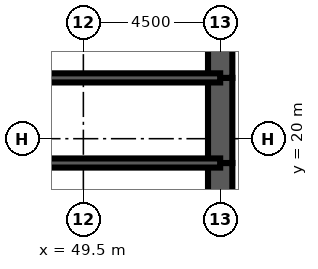
"""IFC4 building model, lengths in metres.
Left out: names, types, materials, properties, quantities, classifications, styles, units other than length and angle.
Written with IfcOpenShell. Run it as: python <this file> out.ifc"""

import sys

from ifc_helpers import new_model, si_unit, direction, frame, frame_2d, origin, place, context, subcontext, project, spatial, rectangle, extrude, element, fill, save


model = new_model("IFC4")
c1 = context("Model", 3, precision=1e-05, world=origin(), true_north=direction((0.0, 1.0)))
c2 = subcontext(c1, "Body", "Model", "MODEL_VIEW")
j1 = project(units=[si_unit("LENGTHUNIT", "METRE"), si_unit("PLANEANGLEUNIT", "RADIAN")], contexts=[c1])
p1 = place(None, origin())
s1 = spatial("IfcSite", under=j1, at=p1, CompositionType="ELEMENT")
p2 = place(p1, origin())
s2 = spatial("IfcBuilding", under=s1, at=p2, CompositionType="ELEMENT")
p3 = place(p2, frame((0.0, 0.0, 198.4)))
s3 = spatial("IfcBuildingStorey", under=s2, at=p3, CompositionType="ELEMENT", Elevation=198.4)
p4 = place(p3, frame((54.0, 16.0, 0.0), z_axis=(0.0, 0.0, 1.0), x_axis=(0.0, 1.0, 0.0)))
e1 = element("IfcWall", 1, at=p4, inside=s3, PredefinedType="SHEAR", context=c2, shape_type="SweptSolid", body=[
    extrude(rectangle(XDim=3.2, YDim=0.8, at=frame_2d((1.6, 0.0))), origin(), (0.0, 0.0, 1.0), 4.2),
])
p5 = place(p3, frame((54.0, 19.2, 0.0), z_axis=(0.0, 0.0, 1.0), x_axis=(0.0, 1.0, 0.0)))
e2 = element("IfcWall", 2, at=p5, inside=s3, PredefinedType="SHEAR", context=c2, shape_type="SweptSolid", body=[
    extrude(rectangle(XDim=2.8, YDim=0.8, at=frame_2d((1.4, 0.0))), origin(), (0.0, 0.0, 1.0), 4.2),
])
p6 = place(p5, frame((0.4, 0.0, 0.0)))
e3 = element("IfcOpeningElement", 3, at=p6, cuts=e2, PredefinedType="OPENING", context=c2, shape_type="SweptSolid", body=[
    extrude(rectangle(XDim=1.8, YDim=2.1, at=frame_2d((0.9, 1.05))), frame((0.0, 0.41, 0.0), z_axis=(0.0, -1.0, 0.0), x_axis=(1.0, 0.0, 0.0)), (0.0, 0.0, 1.0), 0.82),
])
p7 = place(p3, frame((54.0, 22.0, 0.0), z_axis=(0.0, 0.0, 1.0), x_axis=(0.0, 1.0, 0.0)))
e4 = element("IfcWall", 4, at=p7, inside=s3, PredefinedType="SHEAR", context=c2, shape_type="SweptSolid", body=[
    extrude(rectangle(XDim=4.0, YDim=0.8, at=frame_2d((2.0, 0.0))), origin(), (0.0, 0.0, 1.0), 4.2),
])
p8 = place(p3, frame((45.0, 19.2, 0.0), z_axis=(0.0, 0.0, 1.0), x_axis=(1.0, 0.0, 0.0)))
e5 = element("IfcWall", 5, at=p8, inside=s3, PredefinedType="SOLIDWALL", context=c2, shape_type="SweptSolid", body=[
    extrude(rectangle(XDim=9.0, YDim=0.3, at=frame_2d((4.5, 0.0))), origin(), (0.0, 0.0, 1.0), 4.2),
])
p9 = place(p8, frame((7.35, 0.0, 0.0)))
e6 = element("IfcOpeningElement", 6, at=p9, cuts=e5, PredefinedType="OPENING", context=c2, shape_type="SweptSolid", body=[
    extrude(rectangle(XDim=1.0, YDim=2.1, at=frame_2d((0.5, 1.05))), frame((0.0, 0.16, 0.0), z_axis=(0.0, -1.0, 0.0), x_axis=(1.0, 0.0, 0.0)), (0.0, 0.0, 1.0), 0.32),
])
p10 = place(p3, frame((48.0, 22.0, 0.0), z_axis=(0.0, 0.0, 1.0), x_axis=(1.0, 0.0, 0.0)))
e7 = element("IfcWall", 7, at=p10, inside=s3, PredefinedType="SOLIDWALL", context=c2, shape_type="SweptSolid", body=[
    extrude(rectangle(XDim=6.0, YDim=0.3, at=frame_2d((3.0, 0.0))), origin(), (0.0, 0.0, 1.0), 4.2),
])
p11 = place(p10, frame((2.0, 0.0, 0.0)))
e8 = element("IfcOpeningElement", 8, at=p11, cuts=e7, PredefinedType="OPENING", context=c2, shape_type="SweptSolid", body=[
    extrude(rectangle(XDim=1.0, YDim=2.1, at=frame_2d((0.5, 1.05))), frame((0.0, 0.16, 0.0), z_axis=(0.0, -1.0, 0.0), x_axis=(1.0, 0.0, 0.0)), (0.0, 0.0, 1.0), 0.32),
])
p12 = place(p10, frame((4.05, 0.0, 0.0)))
e9 = element("IfcOpeningElement", 9, at=p12, cuts=e7, PredefinedType="OPENING", context=c2, shape_type="SweptSolid", body=[
    extrude(rectangle(XDim=1.0, YDim=2.1, at=frame_2d((0.5, 1.05))), frame((0.0, 0.16, 0.0), z_axis=(0.0, -1.0, 0.0), x_axis=(1.0, 0.0, 0.0)), (0.0, 0.0, 1.0), 0.32),
])
p13 = place(p3, frame((51.425, 22.15, 0.0), z_axis=(0.0, 0.0, 1.0), x_axis=(0.0, 1.0, 0.0)))
e10 = element("IfcWall", 10, at=p13, inside=s3, PredefinedType="PARTITIONING", context=c2, shape_type="SweptSolid", body=[
    extrude(rectangle(XDim=3.7, YDim=0.15, at=frame_2d((1.85, 0.0))), origin(), (0.0, 0.0, 1.0), 3.0),
])
p14 = place(p3, frame((49.4, 19.35, 0.0), z_axis=(0.0, 0.0, 1.0), x_axis=(0.0, 1.0, 0.0)))
e11 = element("IfcWall", 11, at=p14, inside=s3, PredefinedType="PARTITIONING", context=c2, shape_type="SweptSolid", body=[
    extrude(rectangle(XDim=2.5, YDim=0.15, at=frame_2d((1.25, 0.0))), origin(), (0.0, 0.0, 1.0), 3.0),
])
p15 = place(p14, frame((1.15, 0.0, 0.0)))
e12 = element("IfcOpeningElement", 12, at=p15, cuts=e11, PredefinedType="OPENING", context=c2, shape_type="SweptSolid", body=[
    extrude(rectangle(XDim=1.0, YDim=2.1, at=frame_2d((0.5, 1.05))), frame((0.0, 0.085, 0.0), z_axis=(0.0, -1.0, 0.0), x_axis=(1.0, 0.0, 0.0)), (0.0, 0.0, 1.0), 0.17),
])
p16 = place(p15, origin())
e13 = element("IfcDoor", 13, at=p16, inside=s3, OperationType="SINGLE_SWING_RIGHT", PredefinedType="DOOR", context=c2, shape_type="SweptSolid", body=[
    extrude(rectangle(XDim=1.0, YDim=2.1, at=frame_2d((0.5, 1.05))), frame((0.0, 0.025, 0.0), z_axis=(0.0, -1.0, 0.0), x_axis=(1.0, 0.0, 0.0)), (0.0, 0.0, 1.0), 0.05),
])
fill(e12, e13)
p17 = place(p9, origin())
e14 = element("IfcDoor", 14, at=p17, inside=s3, OperationType="SINGLE_SWING_RIGHT", PredefinedType="DOOR", context=c2, shape_type="SweptSolid", body=[
    extrude(rectangle(XDim=1.0, YDim=2.1, at=frame_2d((0.5, 1.05))), frame((0.0, 0.025, 0.0), z_axis=(0.0, -1.0, 0.0), x_axis=(1.0, 0.0, 0.0)), (0.0, 0.0, 1.0), 0.05),
])
fill(e6, e14)
p18 = place(p6, origin())
e15 = element("IfcDoor", 15, at=p18, inside=s3, OperationType="SINGLE_SWING_LEFT", PredefinedType="DOOR", context=c2, shape_type="SweptSolid", body=[
    extrude(rectangle(XDim=1.8, YDim=2.1, at=frame_2d((0.9, 1.05))), frame((0.0, 0.4, 0.0), z_axis=(0.0, -1.0, 0.0), x_axis=(1.0, 0.0, 0.0)), (0.0, 0.0, 1.0), 0.8),
])
fill(e3, e15)
p19 = place(p11, origin())
e16 = element("IfcDoor", 16, at=p19, inside=s3, OperationType="SINGLE_SWING_LEFT", PredefinedType="DOOR", context=c2, shape_type="SweptSolid", body=[
    extrude(rectangle(XDim=1.0, YDim=2.1, at=frame_2d((0.5, 1.05))), frame((0.0, 0.025, 0.0), z_axis=(0.0, -1.0, 0.0), x_axis=(1.0, 0.0, 0.0)), (0.0, 0.0, 1.0), 0.05),
])
fill(e8, e16)
p20 = place(p12, origin())
e17 = element("IfcDoor", 17, at=p20, inside=s3, OperationType="SINGLE_SWING_RIGHT", PredefinedType="DOOR", context=c2, shape_type="SweptSolid", body=[
    extrude(rectangle(XDim=1.0, YDim=2.1, at=frame_2d((0.5, 1.05))), frame((0.0, 0.025, 0.0), z_axis=(0.0, -1.0, 0.0), x_axis=(1.0, 0.0, 0.0)), (0.0, 0.0, 1.0), 0.05),
])
fill(e9, e17)
save(model, sys.argv[1])
